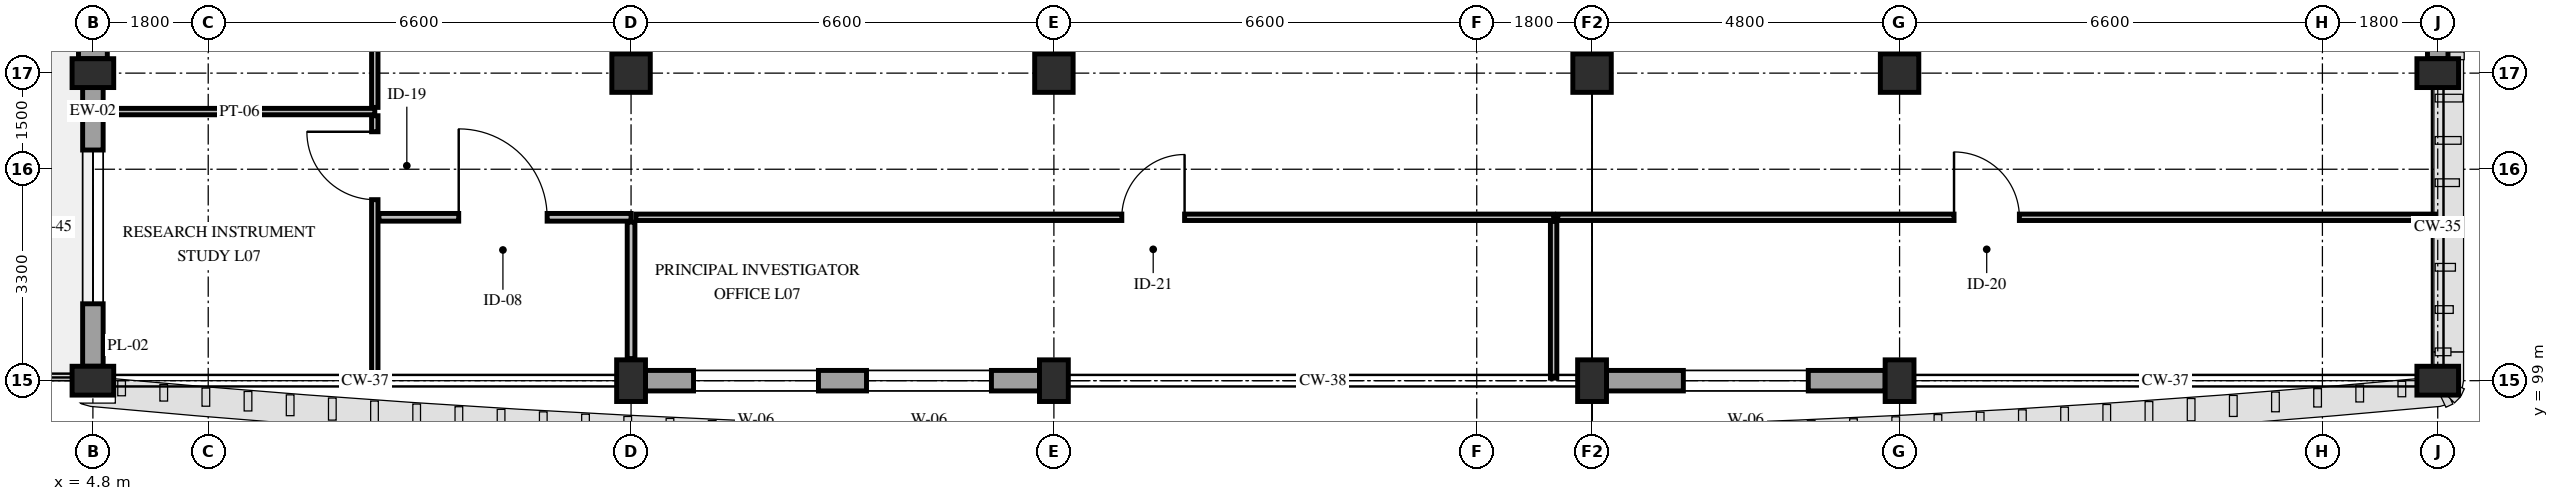
"""IFC4 building model, lengths in metres.
Left out: names, types, materials, properties, quantities, classifications, styles, units other than length and angle.
Written with IfcOpenShell. Run it as: python <this file> out.ifc"""

import sys

from ifc_helpers import new_model, si_unit, direction, frame, frame_2d, origin, origin_2d, place, context, subcontext, project, spatial, rectangle, extrude, element, fill, save


model = new_model("IFC4")
c1 = context("Model", 3, precision=1e-05, world=origin(), true_north=direction((0.0, 1.0)))
c2 = subcontext(c1, "Body", "Model", "MODEL_VIEW")
j1 = project(units=[si_unit("LENGTHUNIT", "METRE"), si_unit("PLANEANGLEUNIT", "RADIAN")], contexts=[c1])
p1 = place(None, origin())
s1 = spatial("IfcSite", under=j1, at=p1, CompositionType="ELEMENT")
p2 = place(p1, origin())
s2 = spatial("IfcBuilding", under=s1, at=p2, CompositionType="ELEMENT")
p3 = place(p2, frame((0.0, 0.0, 34.2)))
s3 = spatial("IfcBuildingStorey", under=s2, at=p3, CompositionType="ELEMENT", Elevation=34.2)
for number, where, z_axis, x_axis in (
    (1, (4.8, 99.0, 0.0), (0.0, 0.0, 1.0), (0.0, 1.0, 0.0)),
    (2, (4.8, 103.8, 0.0), (0.0, 0.0, 1.0), (0.0, 1.0, 0.0)),
    (3, (13.2, 99.0, 0.0), (0.0, 0.0, 1.0), (1.0, 0.0, 0.0)),
):
    element("IfcColumn", number, at=place(p3, frame(where, z_axis=z_axis, x_axis=x_axis)), inside=s3, PredefinedType="PILASTER", context=c2, shape_type="SweptSolid", body=[
        extrude(rectangle(XDim=0.45, YDim=0.65, at=origin_2d()), origin(), (0.0, 0.0, 1.0), 4.2),
    ])
p4 = place(p3, frame((13.2, 103.8, 0.0), z_axis=(0.0, 0.0, 1.0), x_axis=(1.0, 0.0, 0.0)))
e4 = element("IfcColumn", 4, at=p4, inside=s3, PredefinedType="COLUMN", context=c2, shape_type="SweptSolid", body=[
    extrude(rectangle(XDim=0.6, YDim=0.6, at=origin_2d()), origin(), (0.0, 0.0, 1.0), 4.2),
])
p5 = place(p3, frame((19.8, 99.0, 0.0), z_axis=(0.0, 0.0, 1.0), x_axis=(1.0, 0.0, 0.0)))
e5 = element("IfcColumn", 5, at=p5, inside=s3, PredefinedType="PILASTER", context=c2, shape_type="SweptSolid", body=[
    extrude(rectangle(XDim=0.45, YDim=0.65, at=origin_2d()), origin(), (0.0, 0.0, 1.0), 4.2),
])
p6 = place(p3, frame((19.8, 103.8, 0.0), z_axis=(0.0, 0.0, 1.0), x_axis=(1.0, 0.0, 0.0)))
e6 = element("IfcColumn", 6, at=p6, inside=s3, PredefinedType="COLUMN", context=c2, shape_type="SweptSolid", body=[
    extrude(rectangle(XDim=0.6, YDim=0.6, at=origin_2d()), origin(), (0.0, 0.0, 1.0), 4.2),
])
p7 = place(p3, frame((28.2, 99.0, 0.0), z_axis=(0.0, 0.0, 1.0), x_axis=(1.0, 0.0, 0.0)))
e7 = element("IfcColumn", 7, at=p7, inside=s3, PredefinedType="PILASTER", context=c2, shape_type="SweptSolid", body=[
    extrude(rectangle(XDim=0.45, YDim=0.65, at=origin_2d()), origin(), (0.0, 0.0, 1.0), 4.2),
])
p8 = place(p3, frame((28.2, 103.8, 0.0), z_axis=(0.0, 0.0, 1.0), x_axis=(1.0, 0.0, 0.0)))
e8 = element("IfcColumn", 8, at=p8, inside=s3, PredefinedType="COLUMN", context=c2, shape_type="SweptSolid", body=[
    extrude(rectangle(XDim=0.6, YDim=0.6, at=origin_2d()), origin(), (0.0, 0.0, 1.0), 4.2),
])
p9 = place(p3, frame((33.0, 99.0, 0.0), z_axis=(0.0, 0.0, 1.0), x_axis=(1.0, 0.0, 0.0)))
e9 = element("IfcColumn", 9, at=p9, inside=s3, PredefinedType="PILASTER", context=c2, shape_type="SweptSolid", body=[
    extrude(rectangle(XDim=0.45, YDim=0.65, at=origin_2d()), origin(), (0.0, 0.0, 1.0), 4.2),
])
p10 = place(p3, frame((33.0, 103.8, 0.0), z_axis=(0.0, 0.0, 1.0), x_axis=(1.0, 0.0, 0.0)))
e10 = element("IfcColumn", 10, at=p10, inside=s3, PredefinedType="COLUMN", context=c2, shape_type="SweptSolid", body=[
    extrude(rectangle(XDim=0.6, YDim=0.6, at=origin_2d()), origin(), (0.0, 0.0, 1.0), 4.2),
])
for number, where, z_axis, x_axis in (
    (11, (41.4, 99.0, 0.0), (0.0, 0.0, 1.0), (0.0, 1.0, 0.0)),
    (12, (41.4, 103.8, 0.0), (0.0, 0.0, 1.0), (0.0, 1.0, 0.0)),
):
    element("IfcColumn", number, at=place(p3, frame(where, z_axis=z_axis, x_axis=x_axis)), inside=s3, PredefinedType="PILASTER", context=c2, shape_type="SweptSolid", body=[
        extrude(rectangle(XDim=0.45, YDim=0.65, at=origin_2d()), origin(), (0.0, 0.0, 1.0), 4.2),
    ])
p11 = place(p3, frame((4.8, 99.225, 0.0), z_axis=(0.0, 0.0, 1.0), x_axis=(0.0, 1.0, 0.0)))
e13 = element("IfcWall", 13, at=p11, inside=s3, PredefinedType="STANDARD", context=c2, shape_type="SweptSolid", body=[
    extrude(rectangle(XDim=4.35, YDim=0.32, at=frame_2d((2.175, 0.0))), origin(), (0.0, 0.0, 1.0), 3.23),
])
p12 = place(p11, frame((0.975, 0.0, 0.65)))
e14 = element("IfcOpeningElement", 14, at=p12, cuts=e13, PredefinedType="OPENING", context=c2, shape_type="SweptSolid", body=[
    extrude(rectangle(XDim=2.4, YDim=2.24, at=frame_2d((1.2, 1.12))), frame((0.0, 0.175, 0.0), z_axis=(0.0, -1.0, 0.0), x_axis=(1.0, 0.0, 0.0)), (0.0, 0.0, 1.0), 0.35),
])
p13 = place(p3, frame((4.8, 104.025, 0.0), z_axis=(0.0, 0.0, 1.0), x_axis=(0.0, 1.0, 0.0)))
e15 = element("IfcWall", 15, at=p13, inside=s3, PredefinedType="SOLIDWALL", context=c2, shape_type="SweptSolid", body=[
    extrude(rectangle(XDim=6.15, YDim=0.45, at=frame_2d((3.075, 0.0))), origin(), (0.0, 0.0, 1.0), 3.23),
])
p14 = place(p3, frame((41.4, 110.175, 0.0), z_axis=(0.0, 0.0, 1.0), x_axis=(0.0, -1.0, 0.0)))
e16 = element("IfcWall", 16, at=p14, inside=s3, PredefinedType="STANDARD", context=c2, shape_type="SweptSolid", body=[
    extrude(rectangle(XDim=6.15, YDim=0.32, at=frame_2d((3.075, 0.0))), origin(), (0.0, 0.0, 1.0), 3.23),
])
p15 = place(p14, frame((1.05, 0.0, 0.85)))
e17 = element("IfcOpeningElement", 17, at=p15, cuts=e16, PredefinedType="OPENING", context=c2, shape_type="SweptSolid", body=[
    extrude(rectangle(XDim=1.5, YDim=1.5, at=frame_2d((0.75, 0.75))), frame((0.0, 0.175, 0.0), z_axis=(0.0, -1.0, 0.0), x_axis=(1.0, 0.0, 0.0)), (0.0, 0.0, 1.0), 0.35),
])
p16 = place(p14, frame((3.6, 0.0, 0.85)))
e18 = element("IfcOpeningElement", 18, at=p16, cuts=e16, PredefinedType="OPENING", context=c2, shape_type="SweptSolid", body=[
    extrude(rectangle(XDim=1.5, YDim=1.5, at=frame_2d((0.75, 0.75))), frame((0.0, 0.175, 0.0), z_axis=(0.0, -1.0, 0.0), x_axis=(1.0, 0.0, 0.0)), (0.0, 0.0, 1.0), 0.35),
])
p17 = place(p3, frame((32.775, 99.0, 0.0), z_axis=(0.0, 0.0, 1.0), x_axis=(-1.0, 0.0, 0.0)))
e19 = element("IfcWall", 19, at=p17, inside=s3, PredefinedType="STANDARD", context=c2, shape_type="SweptSolid", body=[
    extrude(rectangle(XDim=4.35, YDim=0.32, at=frame_2d((2.175, 0.0))), origin(), (0.0, 0.0, 1.0), 3.35),
])
p18 = place(p17, frame((1.2, 0.0, 0.85)))
e20 = element("IfcOpeningElement", 20, at=p18, cuts=e19, PredefinedType="OPENING", context=c2, shape_type="SweptSolid", body=[
    extrude(rectangle(XDim=1.95, YDim=1.5, at=frame_2d((0.975, 0.75))), frame((0.0, 0.175, 0.0), z_axis=(0.0, -1.0, 0.0), x_axis=(1.0, 0.0, 0.0)), (0.0, 0.0, 1.0), 0.35),
])
p19 = place(p3, frame((19.575, 99.0, 0.0), z_axis=(0.0, 0.0, 1.0), x_axis=(-1.0, 0.0, 0.0)))
e21 = element("IfcWall", 21, at=p19, inside=s3, PredefinedType="STANDARD", context=c2, shape_type="SweptSolid", body=[
    extrude(rectangle(XDim=6.15, YDim=0.32, at=frame_2d((3.075, 0.0))), origin(), (0.0, 0.0, 1.0), 3.33),
])
p20 = place(p19, frame((0.75, 0.0, 0.85)))
e22 = element("IfcOpeningElement", 22, at=p20, cuts=e21, PredefinedType="OPENING", context=c2, shape_type="SweptSolid", body=[
    extrude(rectangle(XDim=1.95, YDim=1.5, at=frame_2d((0.975, 0.75))), frame((0.0, 0.175, 0.0), z_axis=(0.0, -1.0, 0.0), x_axis=(1.0, 0.0, 0.0)), (0.0, 0.0, 1.0), 0.35),
])
p21 = place(p19, frame((3.45, 0.0, 0.85)))
e23 = element("IfcOpeningElement", 23, at=p21, cuts=e21, PredefinedType="OPENING", context=c2, shape_type="SweptSolid", body=[
    extrude(rectangle(XDim=1.95, YDim=1.5, at=frame_2d((0.975, 0.75))), frame((0.0, 0.175, 0.0), z_axis=(0.0, -1.0, 0.0), x_axis=(1.0, 0.0, 0.0)), (0.0, 0.0, 1.0), 0.35),
])
p22 = place(p3, frame((4.975, 103.2, 0.0), z_axis=(0.0, 0.0, 1.0), x_axis=(1.0, 0.0, 0.0)))
e24 = element("IfcWall", 24, at=p22, inside=s3, PredefinedType="PARTITIONING", context=c2, shape_type="SweptSolid", body=[
    extrude(rectangle(XDim=4.225, YDim=0.1, at=frame_2d((2.112, 0.0))), origin(), (0.0, 0.0, 1.0), 3.48),
])
p23 = place(p3, frame((9.2, 103.265, 0.0), z_axis=(0.0, 0.0, 1.0), x_axis=(0.0, 1.0, 0.0)))
e25 = element("IfcWall", 25, at=p23, inside=s3, PredefinedType="PARTITIONING", context=c2, shape_type="SweptSolid", body=[
    extrude(rectangle(XDim=7.62, YDim=0.1, at=frame_2d((3.81, 0.0))), origin(), (0.0, 0.0, 1.0), 3.23),
])
p24 = place(p23, frame((3.305, 0.0, 0.0)))
e26 = element("IfcOpeningElement", 26, at=p24, cuts=e25, PredefinedType="OPENING", context=c2, shape_type="SweptSolid", body=[
    extrude(rectangle(XDim=1.06, YDim=2.2, at=frame_2d((0.53, 1.1))), frame((0.0, 0.065, 0.0), z_axis=(0.0, -1.0, 0.0), x_axis=(1.0, 0.0, 0.0)), (0.0, 0.0, 1.0), 0.13),
])
p25 = place(p3, frame((9.2, 99.04, 0.0), z_axis=(0.0, 0.0, 1.0), x_axis=(0.0, 1.0, 0.0)))
e27 = element("IfcWall", 27, at=p25, inside=s3, PredefinedType="PARTITIONING", context=c2, shape_type="SweptSolid", body=[
    extrude(rectangle(XDim=4.095, YDim=0.1, at=frame_2d((2.047, 0.0))), origin(), (0.0, 0.0, 1.0), 3.33),
])
p26 = place(p25, frame((2.785, 0.0, 0.0)))
e28 = element("IfcOpeningElement", 28, at=p26, cuts=e27, PredefinedType="OPENING", context=c2, shape_type="SweptSolid", body=[
    extrude(rectangle(XDim=1.06, YDim=2.2, at=frame_2d((0.53, 1.1))), frame((0.0, 0.065, 0.0), z_axis=(0.0, -1.0, 0.0), x_axis=(1.0, 0.0, 0.0)), (0.0, 0.0, 1.0), 0.13),
])
p27 = place(p3, frame((9.265, 101.55, 0.0), z_axis=(0.0, 0.0, 1.0), x_axis=(1.0, 0.0, 0.0)))
e29 = element("IfcWall", 29, at=p27, inside=s3, PredefinedType="PARTITIONING", context=c2, shape_type="SweptSolid", body=[
    extrude(rectangle(XDim=3.935, YDim=0.12, at=frame_2d((1.968, 0.0))), origin(), (0.0, 0.0, 1.0), 3.53),
])
p28 = place(p27, frame((1.245, 0.0, 0.0)))
e30 = element("IfcOpeningElement", 30, at=p28, cuts=e29, PredefinedType="OPENING", context=c2, shape_type="SweptSolid", body=[
    extrude(rectangle(XDim=1.38, YDim=2.25, at=frame_2d((0.69, 1.125))), frame((0.0, 0.075, 0.0), z_axis=(0.0, -1.0, 0.0), x_axis=(1.0, 0.0, 0.0)), (0.0, 0.0, 1.0), 0.15),
])
p29 = place(p3, frame((13.2, 99.345, 0.0), z_axis=(0.0, 0.0, 1.0), x_axis=(0.0, 1.0, 0.0)))
e31 = element("IfcWall", 31, at=p29, inside=s3, PredefinedType="PARTITIONING", context=c2, shape_type="SweptSolid", body=[
    extrude(rectangle(XDim=2.13, YDim=0.12, at=frame_2d((1.065, 0.0))), origin(), (0.0, 0.0, 1.0), 3.53),
])
p30 = place(p3, frame((13.275, 101.55, 0.0), z_axis=(0.0, 0.0, 1.0), x_axis=(1.0, 0.0, 0.0)))
e32 = element("IfcWall", 32, at=p30, inside=s3, PredefinedType="PARTITIONING", context=c2, shape_type="SweptSolid", body=[
    extrude(rectangle(XDim=14.325, YDim=0.1, at=frame_2d((7.163, 0.0))), origin(), (0.0, 0.0, 1.0), 3.53),
])
p31 = place(p30, frame((7.585, 0.0, 0.0)))
e33 = element("IfcOpeningElement", 33, at=p31, cuts=e32, PredefinedType="OPENING", context=c2, shape_type="SweptSolid", body=[
    extrude(rectangle(XDim=0.98, YDim=2.2, at=frame_2d((0.49, 1.1))), frame((0.0, 0.065, 0.0), z_axis=(0.0, -1.0, 0.0), x_axis=(1.0, 0.0, 0.0)), (0.0, 0.0, 1.0), 0.13),
])
p32 = place(p3, frame((27.6, 99.04, 0.0), z_axis=(0.0, 0.0, 1.0), x_axis=(0.0, 1.0, 0.0)))
e34 = element("IfcWall", 34, at=p32, inside=s3, PredefinedType="PARTITIONING", context=c2, shape_type="SweptSolid", body=[
    extrude(rectangle(XDim=2.445, YDim=0.1, at=frame_2d((1.223, 0.0))), origin(), (0.0, 0.0, 1.0), 3.33),
])
p33 = place(p3, frame((27.665, 101.55, 0.0), z_axis=(0.0, 0.0, 1.0), x_axis=(1.0, 0.0, 0.0)))
e35 = element("IfcWall", 35, at=p33, inside=s3, PredefinedType="PARTITIONING", context=c2, shape_type="SweptSolid", body=[
    extrude(rectangle(XDim=13.695, YDim=0.1, at=frame_2d((6.848, 0.0))), origin(), (0.0, 0.0, 1.0), 3.48),
])
p34 = place(p33, frame((6.185, 0.0, 0.0)))
e36 = element("IfcOpeningElement", 36, at=p34, cuts=e35, PredefinedType="OPENING", context=c2, shape_type="SweptSolid", body=[
    extrude(rectangle(XDim=1.02, YDim=2.2, at=frame_2d((0.51, 1.1))), frame((0.0, 0.065, 0.0), z_axis=(0.0, -1.0, 0.0), x_axis=(1.0, 0.0, 0.0)), (0.0, 0.0, 1.0), 0.13),
])
p35 = place(p12, origin())
e37 = element("IfcWindow", 37, at=p35, inside=s3, PartitioningType="DOUBLE_PANEL_VERTICAL", PredefinedType="WINDOW", context=c2, shape_type="SweptSolid", body=[
    extrude(rectangle(XDim=2.4, YDim=2.24, at=frame_2d((1.2, 1.12))), frame((0.0, 0.03, 0.0), z_axis=(0.0, -1.0, 0.0), x_axis=(1.0, 0.0, 0.0)), (0.0, 0.0, 1.0), 0.06),
])
fill(e14, e37)
p36 = place(p18, origin())
e38 = element("IfcWindow", 38, at=p36, inside=s3, PartitioningType="DOUBLE_PANEL_VERTICAL", PredefinedType="WINDOW", context=c2, shape_type="SweptSolid", body=[
    extrude(rectangle(XDim=1.95, YDim=1.5, at=frame_2d((0.975, 0.75))), frame((0.0, 0.03, 0.0), z_axis=(0.0, -1.0, 0.0), x_axis=(1.0, 0.0, 0.0)), (0.0, 0.0, 1.0), 0.06),
])
fill(e20, e38)
p37 = place(p20, origin())
e39 = element("IfcWindow", 39, at=p37, inside=s3, PartitioningType="DOUBLE_PANEL_VERTICAL", PredefinedType="WINDOW", context=c2, shape_type="SweptSolid", body=[
    extrude(rectangle(XDim=1.95, YDim=1.5, at=frame_2d((0.975, 0.75))), frame((0.0, 0.03, 0.0), z_axis=(0.0, -1.0, 0.0), x_axis=(1.0, 0.0, 0.0)), (0.0, 0.0, 1.0), 0.06),
])
fill(e22, e39)
p38 = place(p21, origin())
e40 = element("IfcWindow", 40, at=p38, inside=s3, PartitioningType="DOUBLE_PANEL_VERTICAL", PredefinedType="WINDOW", context=c2, shape_type="SweptSolid", body=[
    extrude(rectangle(XDim=1.95, YDim=1.5, at=frame_2d((0.975, 0.75))), frame((0.0, 0.03, 0.0), z_axis=(0.0, -1.0, 0.0), x_axis=(1.0, 0.0, 0.0)), (0.0, 0.0, 1.0), 0.06),
])
fill(e23, e40)
p39 = place(p26, origin())
e41 = element("IfcDoor", 41, at=p39, inside=s3, OperationType="SINGLE_SWING_RIGHT", PredefinedType="DOOR", context=c2, shape_type="SweptSolid", body=[
    extrude(rectangle(XDim=1.06, YDim=2.2, at=frame_2d((0.53, 1.1))), frame((0.0, 0.025, 0.0), z_axis=(0.0, -1.0, 0.0), x_axis=(1.0, 0.0, 0.0)), (0.0, 0.0, 1.0), 0.05),
])
fill(e28, e41)
p40 = place(p28, origin())
e42 = element("IfcDoor", 42, at=p40, inside=s3, OperationType="SINGLE_SWING_LEFT", PredefinedType="DOOR", context=c2, shape_type="SweptSolid", body=[
    extrude(rectangle(XDim=1.38, YDim=2.25, at=frame_2d((0.69, 1.125))), frame((0.0, 0.025, 0.0), z_axis=(0.0, -1.0, 0.0), x_axis=(1.0, 0.0, 0.0)), (0.0, 0.0, 1.0), 0.05),
])
fill(e30, e42)
p41 = place(p31, origin())
e43 = element("IfcDoor", 43, at=p41, inside=s3, OperationType="SINGLE_SWING_RIGHT", PredefinedType="DOOR", context=c2, shape_type="SweptSolid", body=[
    extrude(rectangle(XDim=0.98, YDim=2.2, at=frame_2d((0.49, 1.1))), frame((0.0, 0.025, 0.0), z_axis=(0.0, -1.0, 0.0), x_axis=(1.0, 0.0, 0.0)), (0.0, 0.0, 1.0), 0.05),
])
fill(e33, e43)
p42 = place(p34, origin())
e44 = element("IfcDoor", 44, at=p42, inside=s3, OperationType="SINGLE_SWING_LEFT", PredefinedType="DOOR", context=c2, shape_type="SweptSolid", body=[
    extrude(rectangle(XDim=1.02, YDim=2.2, at=frame_2d((0.51, 1.1))), frame((0.0, 0.025, 0.0), z_axis=(0.0, -1.0, 0.0), x_axis=(1.0, 0.0, 0.0)), (0.0, 0.0, 1.0), 0.05),
])
fill(e36, e44)
save(model, sys.argv[1])
